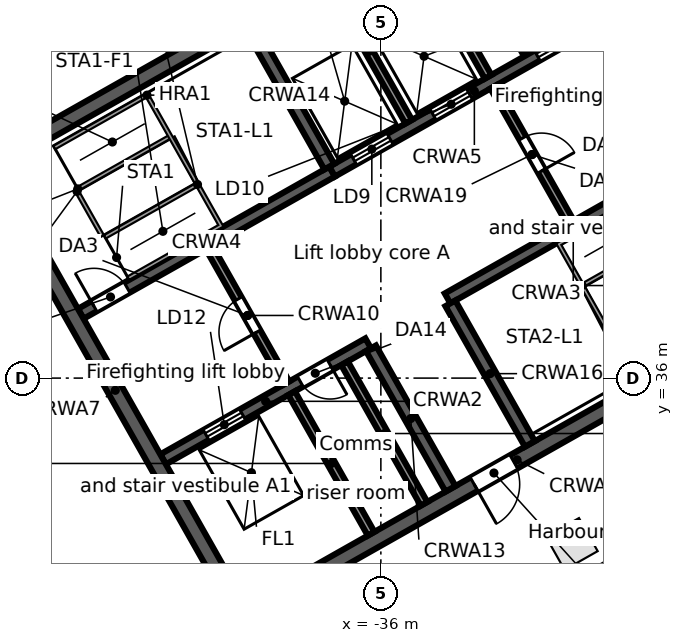
"""IFC4 building model, lengths in metres.
Left out: names, types, materials, properties, quantities, classifications, styles, units other than length and angle.
Written with IfcOpenShell. Run it as: python <this file> out.ifc"""

import sys

from ifc_helpers import new_model, si_unit, direction, frame, frame_2d, origin, origin_2d, place, context, subcontext, project, spatial, rectangle, extrude, element, fill, save


model = new_model("IFC4")
c1 = context("Model", 3, precision=1e-05, world=origin(), true_north=direction((0.0, 1.0)))
c2 = subcontext(c1, "Body", "Model", "MODEL_VIEW")
j1 = project(units=[si_unit("LENGTHUNIT", "METRE"), si_unit("PLANEANGLEUNIT", "RADIAN")], contexts=[c1])
p1 = place(None, origin())
s1 = spatial("IfcSite", under=j1, at=p1, CompositionType="ELEMENT")
p2 = place(p1, origin())
s2 = spatial("IfcBuilding", under=s1, at=p2, CompositionType="ELEMENT")
p3 = place(p2, frame((0.0, 0.0, 331.7)))
s3 = spatial("IfcBuildingStorey", under=s2, at=p3, CompositionType="ELEMENT", Elevation=331.7)
p4 = place(p3, frame((-30.976, 31.635, 0.0), z_axis=(0.0, 0.0, 1.0), x_axis=(0.87035569594, 0.492423560103, 0.0)))
e1 = element("IfcColumn", 1, at=p4, inside=s3, PredefinedType="COLUMN", context=c2, shape_type="SweptSolid", body=[
    extrude(rectangle(XDim=1.0, YDim=1.0, at=origin_2d()), origin(), (0.0, 0.0, 1.0), 3.8),
])
p5 = place(p3, frame((-44.115, 26.507, 0.0), z_axis=(0.0, 0.0, 1.0), x_axis=(-0.857166583633, 0.515039268311, 0.0)))
e2 = element("IfcWall", 2, at=p5, inside=s3, PredefinedType="STANDARD", context=c2, shape_type="SweptSolid", body=[
    extrude(rectangle(XDim=17.106, YDim=0.25, at=frame_2d((8.553, 0.0))), origin(), (0.0, 0.0, 1.0), 3.52),
])
p6 = place(p5, frame((14.417, 0.0, 0.8)))
e3 = element("IfcOpeningElement", 3, at=p6, cuts=e2, PredefinedType="OPENING", context=c2, shape_type="SweptSolid", body=[
    extrude(rectangle(XDim=2.4, YDim=2.2, at=frame_2d((1.2, 1.1))), frame((0.0, 0.135, 0.0), z_axis=(0.0, -1.0, 0.0), x_axis=(1.0, 0.0, 0.0)), (0.0, 0.0, 1.0), 0.27),
])
p7 = place(p5, frame((11.584, 0.0, 0.8)))
e4 = element("IfcOpeningElement", 4, at=p7, cuts=e2, PredefinedType="OPENING", context=c2, shape_type="SweptSolid", body=[
    extrude(rectangle(XDim=2.4, YDim=2.2, at=frame_2d((1.2, 1.1))), frame((0.0, 0.135, 0.0), z_axis=(0.0, -1.0, 0.0), x_axis=(1.0, 0.0, 0.0)), (0.0, 0.0, 1.0), 0.27),
])
p8 = place(p5, frame((8.75, 0.0, 0.8)))
e5 = element("IfcOpeningElement", 5, at=p8, cuts=e2, PredefinedType="OPENING", context=c2, shape_type="SweptSolid", body=[
    extrude(rectangle(XDim=2.4, YDim=2.2, at=frame_2d((1.2, 1.1))), frame((0.0, 0.135, 0.0), z_axis=(0.0, -1.0, 0.0), x_axis=(1.0, 0.0, 0.0)), (0.0, 0.0, 1.0), 0.27),
])
p9 = place(p5, frame((5.917, 0.0, 0.8)))
e6 = element("IfcOpeningElement", 6, at=p9, cuts=e2, PredefinedType="OPENING", context=c2, shape_type="SweptSolid", body=[
    extrude(rectangle(XDim=2.4, YDim=2.2, at=frame_2d((1.2, 1.1))), frame((0.0, 0.135, 0.0), z_axis=(0.0, -1.0, 0.0), x_axis=(1.0, 0.0, 0.0)), (0.0, 0.0, 1.0), 0.27),
])
p10 = place(p5, frame((3.084, 0.0, 0.8)))
e7 = element("IfcOpeningElement", 7, at=p10, cuts=e2, PredefinedType="OPENING", context=c2, shape_type="SweptSolid", body=[
    extrude(rectangle(XDim=2.4, YDim=2.2, at=frame_2d((1.2, 1.1))), frame((0.0, 0.135, 0.0), z_axis=(0.0, -1.0, 0.0), x_axis=(1.0, 0.0, 0.0)), (0.0, 0.0, 1.0), 0.27),
])
p11 = place(p5, frame((0.25, 0.0, 0.8)))
e8 = element("IfcOpeningElement", 8, at=p11, cuts=e2, PredefinedType="OPENING", context=c2, shape_type="SweptSolid", body=[
    extrude(rectangle(XDim=2.4, YDim=2.2, at=frame_2d((1.2, 1.1))), frame((0.0, 0.135, 0.0), z_axis=(0.0, -1.0, 0.0), x_axis=(1.0, 0.0, 0.0)), (0.0, 0.0, 1.0), 0.27),
])
p12 = place(p3, frame((-3.017, 46.293, 0.0), z_axis=(0.0, 0.0, 1.0), x_axis=(-0.870355474887, -0.492423950812, 0.0)))
e9 = element("IfcWall", 9, at=p12, inside=s3, PredefinedType="STANDARD", context=c2, shape_type="SweptSolid", body=[
    extrude(rectangle(XDim=40.34, YDim=0.25, at=frame_2d((20.17, 0.0))), origin(), (0.0, 0.0, 1.0), 3.52),
])
p13 = place(p12, frame((37.428, 0.0, 0.8)))
e10 = element("IfcOpeningElement", 10, at=p13, cuts=e9, PredefinedType="OPENING", context=c2, shape_type="SweptSolid", body=[
    extrude(rectangle(XDim=2.4, YDim=2.2, at=frame_2d((1.2, 1.1))), frame((0.0, 0.135, 0.0), z_axis=(0.0, -1.0, 0.0), x_axis=(1.0, 0.0, 0.0)), (0.0, 0.0, 1.0), 0.27),
])
p14 = place(p12, frame((34.372, 0.0, 0.0)))
e11 = element("IfcOpeningElement", 11, at=p14, cuts=e9, PredefinedType="OPENING", context=c2, shape_type="SweptSolid", body=[
    extrude(rectangle(XDim=1.8, YDim=2.4, at=frame_2d((0.9, 1.2))), frame((0.0, 0.135, 0.0), z_axis=(0.0, -1.0, 0.0), x_axis=(1.0, 0.0, 0.0)), (0.0, 0.0, 1.0), 0.27),
])
p15 = place(p12, frame((30.716, 0.0, 0.8)))
e12 = element("IfcOpeningElement", 12, at=p15, cuts=e9, PredefinedType="OPENING", context=c2, shape_type="SweptSolid", body=[
    extrude(rectangle(XDim=2.4, YDim=2.2, at=frame_2d((1.2, 1.1))), frame((0.0, 0.135, 0.0), z_axis=(0.0, -1.0, 0.0), x_axis=(1.0, 0.0, 0.0)), (0.0, 0.0, 1.0), 0.27),
])
p16 = place(p12, frame((27.36, 0.0, 0.8)))
e13 = element("IfcOpeningElement", 13, at=p16, cuts=e9, PredefinedType="OPENING", context=c2, shape_type="SweptSolid", body=[
    extrude(rectangle(XDim=2.4, YDim=2.2, at=frame_2d((1.2, 1.1))), frame((0.0, 0.135, 0.0), z_axis=(0.0, -1.0, 0.0), x_axis=(1.0, 0.0, 0.0)), (0.0, 0.0, 1.0), 0.27),
])
p17 = place(p12, frame((24.304, 0.0, 0.0)))
e14 = element("IfcOpeningElement", 14, at=p17, cuts=e9, PredefinedType="OPENING", context=c2, shape_type="SweptSolid", body=[
    extrude(rectangle(XDim=1.8, YDim=2.4, at=frame_2d((0.9, 1.2))), frame((0.0, 0.135, 0.0), z_axis=(0.0, -1.0, 0.0), x_axis=(1.0, 0.0, 0.0)), (0.0, 0.0, 1.0), 0.27),
])
p18 = place(p12, frame((20.648, 0.0, 0.8)))
e15 = element("IfcOpeningElement", 15, at=p18, cuts=e9, PredefinedType="OPENING", context=c2, shape_type="SweptSolid", body=[
    extrude(rectangle(XDim=2.4, YDim=2.2, at=frame_2d((1.2, 1.1))), frame((0.0, 0.135, 0.0), z_axis=(0.0, -1.0, 0.0), x_axis=(1.0, 0.0, 0.0)), (0.0, 0.0, 1.0), 0.27),
])
p19 = place(p12, frame((17.292, 0.0, 0.8)))
e16 = element("IfcOpeningElement", 16, at=p19, cuts=e9, PredefinedType="OPENING", context=c2, shape_type="SweptSolid", body=[
    extrude(rectangle(XDim=2.4, YDim=2.2, at=frame_2d((1.2, 1.1))), frame((0.0, 0.135, 0.0), z_axis=(0.0, -1.0, 0.0), x_axis=(1.0, 0.0, 0.0)), (0.0, 0.0, 1.0), 0.27),
])
p20 = place(p12, frame((14.236, 0.0, 0.0)))
e17 = element("IfcOpeningElement", 17, at=p20, cuts=e9, PredefinedType="OPENING", context=c2, shape_type="SweptSolid", body=[
    extrude(rectangle(XDim=1.8, YDim=2.4, at=frame_2d((0.9, 1.2))), frame((0.0, 0.135, 0.0), z_axis=(0.0, -1.0, 0.0), x_axis=(1.0, 0.0, 0.0)), (0.0, 0.0, 1.0), 0.27),
])
p21 = place(p12, frame((10.58, 0.0, 0.8)))
e18 = element("IfcOpeningElement", 18, at=p21, cuts=e9, PredefinedType="OPENING", context=c2, shape_type="SweptSolid", body=[
    extrude(rectangle(XDim=2.4, YDim=2.2, at=frame_2d((1.2, 1.1))), frame((0.0, 0.135, 0.0), z_axis=(0.0, -1.0, 0.0), x_axis=(1.0, 0.0, 0.0)), (0.0, 0.0, 1.0), 0.27),
])
p22 = place(p12, frame((7.224, 0.0, 0.8)))
e19 = element("IfcOpeningElement", 19, at=p22, cuts=e9, PredefinedType="OPENING", context=c2, shape_type="SweptSolid", body=[
    extrude(rectangle(XDim=2.4, YDim=2.2, at=frame_2d((1.2, 1.1))), frame((0.0, 0.135, 0.0), z_axis=(0.0, -1.0, 0.0), x_axis=(1.0, 0.0, 0.0)), (0.0, 0.0, 1.0), 0.27),
])
p23 = place(p12, frame((4.168, 0.0, 0.0)))
e20 = element("IfcOpeningElement", 20, at=p23, cuts=e9, PredefinedType="OPENING", context=c2, shape_type="SweptSolid", body=[
    extrude(rectangle(XDim=1.8, YDim=2.4, at=frame_2d((0.9, 1.2))), frame((0.0, 0.135, 0.0), z_axis=(0.0, -1.0, 0.0), x_axis=(1.0, 0.0, 0.0)), (0.0, 0.0, 1.0), 0.27),
])
p24 = place(p12, frame((0.512, 0.0, 0.8)))
e21 = element("IfcOpeningElement", 21, at=p24, cuts=e9, PredefinedType="OPENING", context=c2, shape_type="SweptSolid", body=[
    extrude(rectangle(XDim=2.4, YDim=2.2, at=frame_2d((1.2, 1.1))), frame((0.0, 0.135, 0.0), z_axis=(0.0, -1.0, 0.0), x_axis=(1.0, 0.0, 0.0)), (0.0, 0.0, 1.0), 0.27),
])
p25 = place(p3, frame((-39.813, 29.662, 0.0), z_axis=(0.0, 0.0, 1.0), x_axis=(0.870350116061, 0.492433422375, 0.0)))
e22 = element("IfcWall", 22, at=p25, inside=s3, PredefinedType="SOLIDWALL", context=c2, shape_type="SweptSolid", body=[
    extrude(rectangle(XDim=17.0, YDim=0.4, at=frame_2d((8.5, 0.0))), origin(), (0.0, 0.0, 1.0), 3.52),
])
p26 = place(p25, frame((7.2, 0.0, 0.0)))
e23 = element("IfcOpeningElement", 23, at=p26, cuts=e22, PredefinedType="OPENING", context=c2, shape_type="SweptSolid", body=[
    extrude(rectangle(XDim=1.2, YDim=2.1, at=frame_2d((0.6, 1.05))), frame((0.0, 0.21, 0.0), z_axis=(0.0, -1.0, 0.0), x_axis=(1.0, 0.0, 0.0)), (0.0, 0.0, 1.0), 0.42),
])
p27 = place(p3, frame((-41.73, 33.863, 0.0), z_axis=(0.0, 0.0, 1.0), x_axis=(0.870350800578, 0.492432212525, 0.0)))
e24 = element("IfcWall", 24, at=p27, inside=s3, PredefinedType="SOLIDWALL", context=c2, shape_type="SweptSolid", body=[
    extrude(rectangle(XDim=6.2, YDim=0.3, at=frame_2d((3.1, 0.0))), origin(), (0.0, 0.0, 1.0), 3.52),
])
p28 = place(p27, frame((1.3, 0.0, 0.0)))
e25 = element("IfcOpeningElement", 25, at=p28, cuts=e24, PredefinedType="OPENING", context=c2, shape_type="SweptSolid", body=[
    extrude(rectangle(XDim=1.1, YDim=2.1, at=frame_2d((0.55, 1.05))), frame((0.0, 0.16, 0.0), z_axis=(0.0, -1.0, 0.0), x_axis=(1.0, 0.0, 0.0)), (0.0, 0.0, 1.0), 0.32),
])
p29 = place(p27, frame((4.15, 0.0, 0.0)))
e26 = element("IfcOpeningElement", 26, at=p29, cuts=e24, PredefinedType="OPENING", context=c2, shape_type="SweptSolid", body=[
    extrude(rectangle(XDim=0.9, YDim=2.1, at=frame_2d((0.45, 1.05))), frame((0.0, 0.16, 0.0), z_axis=(0.0, -1.0, 0.0), x_axis=(1.0, 0.0, 0.0)), (0.0, 0.0, 1.0), 0.32),
])
p30 = place(p3, frame((-34.245, 38.097, 0.0), z_axis=(0.0, 0.0, 1.0), x_axis=(0.870356351998, 0.492422400523, 0.0)))
e27 = element("IfcWall", 27, at=p30, inside=s3, PredefinedType="SOLIDWALL", context=c2, shape_type="SweptSolid", body=[
    extrude(rectangle(XDim=7.6, YDim=0.3, at=frame_2d((3.8, 0.0))), origin(), (0.0, 0.0, 1.0), 3.52),
])
p31 = place(p30, frame((6.2, 0.0, 0.0)))
e28 = element("IfcOpeningElement", 28, at=p31, cuts=e27, PredefinedType="OPENING", context=c2, shape_type="SweptSolid", body=[
    extrude(rectangle(XDim=1.0, YDim=2.1, at=frame_2d((0.5, 1.05))), frame((0.0, 0.16, 0.0), z_axis=(0.0, -1.0, 0.0), x_axis=(1.0, 0.0, 0.0)), (0.0, 0.0, 1.0), 0.32),
])
p32 = place(p3, frame((-43.897, 37.692, 0.0), z_axis=(0.0, 0.0, 1.0), x_axis=(0.870356351998, 0.492422400523, 0.0)))
e29 = element("IfcWall", 29, at=p32, inside=s3, PredefinedType="SOLIDWALL", context=c2, shape_type="SweptSolid", body=[
    extrude(rectangle(XDim=7.6, YDim=0.3, at=frame_2d((3.8, 0.0))), origin(), (0.0, 0.0, 1.0), 3.52),
])
p33 = place(p32, frame((0.4, 0.0, 0.0)))
e30 = element("IfcOpeningElement", 30, at=p33, cuts=e29, PredefinedType="OPENING", context=c2, shape_type="SweptSolid", body=[
    extrude(rectangle(XDim=1.0, YDim=2.1, at=frame_2d((0.5, 1.05))), frame((0.0, 0.16, 0.0), z_axis=(0.0, -1.0, 0.0), x_axis=(1.0, 0.0, 0.0)), (0.0, 0.0, 1.0), 0.32),
])
p34 = place(p3, frame((-37.282, 41.435, 0.0), z_axis=(0.0, 0.0, 1.0), x_axis=(0.870361315115, 0.492413628113, 0.0)))
e31 = element("IfcWall", 31, at=p34, inside=s3, PredefinedType="SOLIDWALL", context=c2, shape_type="SweptSolid", body=[
    extrude(rectangle(XDim=8.6, YDim=0.3, at=frame_2d((4.3, 0.0))), origin(), (0.0, 0.0, 1.0), 3.52),
])
p35 = place(p34, frame((0.65, 0.0, 0.0)))
e32 = element("IfcOpeningElement", 32, at=p35, cuts=e31, PredefinedType="OPENING", context=c2, shape_type="SweptSolid", body=[
    extrude(rectangle(XDim=1.1, YDim=2.1, at=frame_2d((0.55, 1.05))), frame((0.0, 0.16, 0.0), z_axis=(0.0, -1.0, 0.0), x_axis=(1.0, 0.0, 0.0)), (0.0, 0.0, 1.0), 0.32),
])
p36 = place(p34, frame((3.05, 0.0, 0.0)))
e33 = element("IfcOpeningElement", 33, at=p36, cuts=e31, PredefinedType="OPENING", context=c2, shape_type="SweptSolid", body=[
    extrude(rectangle(XDim=1.1, YDim=2.1, at=frame_2d((0.55, 1.05))), frame((0.0, 0.16, 0.0), z_axis=(0.0, -1.0, 0.0), x_axis=(1.0, 0.0, 0.0)), (0.0, 0.0, 1.0), 0.32),
])
p37 = place(p34, frame((6.2, 0.0, 0.0)))
e34 = element("IfcOpeningElement", 34, at=p37, cuts=e31, PredefinedType="OPENING", context=c2, shape_type="SweptSolid", body=[
    extrude(rectangle(XDim=1.1, YDim=2.1, at=frame_2d((0.55, 1.05))), frame((0.0, 0.16, 0.0), z_axis=(0.0, -1.0, 0.0), x_axis=(1.0, 0.0, 0.0)), (0.0, 0.0, 1.0), 0.32),
])
p38 = place(p3, frame((-46.51, 41.499, 0.0), z_axis=(0.0, 0.0, 1.0), x_axis=(0.870356271124, 0.492422543467, 0.0)))
e35 = element("IfcWall", 35, at=p38, inside=s3, PredefinedType="SOLIDWALL", context=c2, shape_type="SweptSolid", body=[
    extrude(rectangle(XDim=17.0, YDim=0.4, at=frame_2d((8.5, 0.0))), origin(), (0.0, 0.0, 1.0), 3.52),
])
p39 = place(p3, frame((-46.238, 41.423, 0.0), z_axis=(0.0, 0.0, 1.0), x_axis=(0.492421663121, -0.870356769198, 0.0)))
e36 = element("IfcWall", 36, at=p39, inside=s3, PredefinedType="SOLIDWALL", context=c2, shape_type="SweptSolid", body=[
    extrude(rectangle(XDim=13.2, YDim=0.4, at=frame_2d((6.6, 0.0))), origin(), (0.0, 0.0, 1.0), 3.52),
])
p40 = place(p3, frame((-38.349, 35.603, 0.0), z_axis=(0.0, 0.0, 1.0), x_axis=(0.492397924348, -0.870370199454, 0.0)))
e37 = element("IfcWall", 37, at=p40, inside=s3, PredefinedType="SOLIDWALL", context=c2, shape_type="SweptSolid", body=[
    extrude(rectangle(XDim=4.25, YDim=0.2, at=frame_2d((2.125, 0.0))), origin(), (0.0, 0.0, 1.0), 3.52),
])
p41 = place(p3, frame((-40.516, 39.433, 0.0), z_axis=(0.0, 0.0, 1.0), x_axis=(0.492453559952, -0.87033872216, 0.0)))
e38 = element("IfcWall", 38, at=p41, inside=s3, PredefinedType="PARTITIONING", context=c2, shape_type="SweptSolid", body=[
    extrude(rectangle(XDim=4.1, YDim=0.2, at=frame_2d((2.05, 0.0))), origin(), (0.0, 0.0, 1.0), 3.52),
])
p42 = place(p41, frame((1.55, 0.0, 0.0)))
e39 = element("IfcOpeningElement", 39, at=p42, cuts=e38, PredefinedType="OPENING", context=c2, shape_type="SweptSolid", body=[
    extrude(rectangle(XDim=1.0, YDim=2.1, at=frame_2d((0.5, 1.05))), frame((0.0, 0.11, 0.0), z_axis=(0.0, -1.0, 0.0), x_axis=(1.0, 0.0, 0.0)), (0.0, 0.0, 1.0), 0.22),
])
p43 = place(p3, frame((-36.956, 36.391, 0.0), z_axis=(0.0, 0.0, 1.0), x_axis=(0.492397924348, -0.870370199454, 0.0)))
e40 = element("IfcWall", 40, at=p43, inside=s3, PredefinedType="SOLIDWALL", context=c2, shape_type="SweptSolid", body=[
    extrude(rectangle(XDim=4.25, YDim=0.2, at=frame_2d((2.125, 0.0))), origin(), (0.0, 0.0, 1.0), 3.52),
])
for number, where, z_axis, x_axis in (
    (41, (-36.26, 36.785, 0.0), (0.0, 0.0, 1.0), (0.492, -0.87, 0.0)),
    (42, (-39.449, 45.264, 0.0), (0.0, 0.0, 1.0), (0.492, -0.87, 0.0)),
    (43, (-34.171, 37.967, 0.0), (0.0, 0.0, 1.0), (0.492, -0.87, 0.0)),
):
    element("IfcWall", number, at=place(p3, frame(where, z_axis=z_axis, x_axis=x_axis)), inside=s3, PredefinedType="SOLIDWALL", context=c2, shape_type="SweptSolid", body=[
        extrude(rectangle(XDim=4.25, YDim=0.3, at=frame_2d((2.125, 0.0))), origin(), (0.0, 0.0, 1.0), 3.52),
    ])
p44 = place(p3, frame((-37.36, 46.446, 0.0), z_axis=(0.0, 0.0, 1.0), x_axis=(0.492422543467, -0.870356271124, 0.0)))
e44 = element("IfcWall", 44, at=p44, inside=s3, PredefinedType="SOLIDWALL", context=c2, shape_type="SweptSolid", body=[
    extrude(rectangle(XDim=4.25, YDim=0.2, at=frame_2d((2.125, 0.0))), origin(), (0.0, 0.0, 1.0), 3.52),
])
p45 = place(p3, frame((-33.031, 43.667, 0.0), z_axis=(0.0, 0.0, 1.0), x_axis=(0.492408451753, -0.87036424366, 0.0)))
e45 = element("IfcWall", 45, at=p45, inside=s3, PredefinedType="PARTITIONING", context=c2, shape_type="SweptSolid", body=[
    extrude(rectangle(XDim=4.1, YDim=0.2, at=frame_2d((2.05, 0.0))), origin(), (0.0, 0.0, 1.0), 3.52),
])
p46 = place(p45, frame((1.55, 0.0, 0.0)))
e46 = element("IfcOpeningElement", 46, at=p46, cuts=e45, PredefinedType="OPENING", context=c2, shape_type="SweptSolid", body=[
    extrude(rectangle(XDim=1.0, YDim=2.1, at=frame_2d((0.5, 1.05))), frame((0.0, 0.11, 0.0), z_axis=(0.0, -1.0, 0.0), x_axis=(1.0, 0.0, 0.0)), (0.0, 0.0, 1.0), 0.22),
])
p47 = place(p3, frame((-35.271, 47.628, 0.0), z_axis=(0.0, 0.0, 1.0), x_axis=(0.492422543467, -0.870356271124, 0.0)))
e47 = element("IfcWall", 47, at=p47, inside=s3, PredefinedType="SOLIDWALL", context=c2, shape_type="SweptSolid", body=[
    extrude(rectangle(XDim=4.25, YDim=0.2, at=frame_2d((2.125, 0.0))), origin(), (0.0, 0.0, 1.0), 3.52),
])
p48 = place(p3, frame((-31.79, 49.597, 0.0), z_axis=(0.0, 0.0, 1.0), x_axis=(0.492421663121, -0.870356769198, 0.0)))
e48 = element("IfcWall", 48, at=p48, inside=s3, PredefinedType="SOLIDWALL", context=c2, shape_type="SweptSolid", body=[
    extrude(rectangle(XDim=13.2, YDim=0.4, at=frame_2d((6.6, 0.0))), origin(), (0.0, 0.0, 1.0), 3.52),
])
p49 = place(p15, origin())
e49 = element("IfcWindow", 49, at=p49, inside=s3, PartitioningType="SINGLE_PANEL", PredefinedType="WINDOW", context=c2, shape_type="SweptSolid", body=[
    extrude(rectangle(XDim=2.4, YDim=2.2, at=frame_2d((1.2, 1.1))), frame((0.0, 0.03, 0.0), z_axis=(0.0, -1.0, 0.0), x_axis=(1.0, 0.0, 0.0)), (0.0, 0.0, 1.0), 0.06),
])
fill(e12, e49)
p50 = place(p35, origin())
e50 = element("IfcDoor", 50, at=p50, inside=s3, OperationType="DOUBLE_DOOR_SLIDING", PredefinedType="DOOR", context=c2, shape_type="SweptSolid", body=[
    extrude(rectangle(XDim=1.1, YDim=2.1, at=frame_2d((0.55, 1.05))), frame((0.0, 0.025, 0.0), z_axis=(0.0, -1.0, 0.0), x_axis=(1.0, 0.0, 0.0)), (0.0, 0.0, 1.0), 0.05),
])
fill(e32, e50)
p51 = place(p36, origin())
e51 = element("IfcDoor", 51, at=p51, inside=s3, OperationType="DOUBLE_DOOR_SLIDING", PredefinedType="DOOR", context=c2, shape_type="SweptSolid", body=[
    extrude(rectangle(XDim=1.1, YDim=2.1, at=frame_2d((0.55, 1.05))), frame((0.0, 0.025, 0.0), z_axis=(0.0, -1.0, 0.0), x_axis=(1.0, 0.0, 0.0)), (0.0, 0.0, 1.0), 0.05),
])
fill(e33, e51)
p52 = place(p37, origin())
e52 = element("IfcDoor", 52, at=p52, inside=s3, OperationType="DOUBLE_DOOR_SLIDING", PredefinedType="DOOR", context=c2, shape_type="SweptSolid", body=[
    extrude(rectangle(XDim=1.1, YDim=2.1, at=frame_2d((0.55, 1.05))), frame((0.0, 0.025, 0.0), z_axis=(0.0, -1.0, 0.0), x_axis=(1.0, 0.0, 0.0)), (0.0, 0.0, 1.0), 0.05),
])
fill(e34, e52)
p53 = place(p28, origin())
e53 = element("IfcDoor", 53, at=p53, inside=s3, OperationType="DOUBLE_DOOR_SLIDING", PredefinedType="DOOR", context=c2, shape_type="SweptSolid", body=[
    extrude(rectangle(XDim=1.1, YDim=2.1, at=frame_2d((0.55, 1.05))), frame((0.0, 0.025, 0.0), z_axis=(0.0, -1.0, 0.0), x_axis=(1.0, 0.0, 0.0)), (0.0, 0.0, 1.0), 0.05),
])
fill(e25, e53)
p54 = place(p33, origin())
e54 = element("IfcDoor", 54, at=p54, inside=s3, OperationType="SINGLE_SWING_LEFT", PredefinedType="DOOR", context=c2, shape_type="SweptSolid", body=[
    extrude(rectangle(XDim=1.0, YDim=2.1, at=frame_2d((0.5, 1.05))), frame((0.0, 0.025, 0.0), z_axis=(0.0, -1.0, 0.0), x_axis=(1.0, 0.0, 0.0)), (0.0, 0.0, 1.0), 0.05),
])
fill(e30, e54)
p55 = place(p42, frame((1.0, 0.0, 0.0), z_axis=(0.0, 0.0, 1.0), x_axis=(-1.0, 0.0, 0.0)))
e55 = element("IfcDoor", 55, at=p55, inside=s3, OperationType="SINGLE_SWING_LEFT", PredefinedType="DOOR", context=c2, shape_type="SweptSolid", body=[
    extrude(rectangle(XDim=1.0, YDim=2.1, at=frame_2d((0.5, 1.05))), frame((0.0, 0.025, 0.0), z_axis=(0.0, -1.0, 0.0), x_axis=(1.0, 0.0, 0.0)), (0.0, 0.0, 1.0), 0.05),
])
fill(e39, e55)
p56 = place(p46, origin())
e56 = element("IfcDoor", 56, at=p56, inside=s3, OperationType="SINGLE_SWING_RIGHT", PredefinedType="DOOR", context=c2, shape_type="SweptSolid", body=[
    extrude(rectangle(XDim=1.0, YDim=2.1, at=frame_2d((0.5, 1.05))), frame((0.0, 0.025, 0.0), z_axis=(0.0, -1.0, 0.0), x_axis=(1.0, 0.0, 0.0)), (0.0, 0.0, 1.0), 0.05),
])
fill(e46, e56)
p57 = place(p26, frame((1.2, 0.0, 0.0), z_axis=(0.0, 0.0, 1.0), x_axis=(-1.0, 0.0, 0.0)))
e57 = element("IfcDoor", 57, at=p57, inside=s3, OperationType="SINGLE_SWING_RIGHT", PredefinedType="DOOR", context=c2, shape_type="SweptSolid", body=[
    extrude(rectangle(XDim=1.2, YDim=2.1, at=frame_2d((0.6, 1.05))), frame((0.0, 0.025, 0.0), z_axis=(0.0, -1.0, 0.0), x_axis=(1.0, 0.0, 0.0)), (0.0, 0.0, 1.0), 0.05),
])
fill(e23, e57)
p58 = place(p29, frame((0.9, 0.0, 0.0), z_axis=(0.0, 0.0, 1.0), x_axis=(-1.0, 0.0, 0.0)))
e58 = element("IfcDoor", 58, at=p58, inside=s3, OperationType="SINGLE_SWING_LEFT", PredefinedType="DOOR", context=c2, shape_type="SweptSolid", body=[
    extrude(rectangle(XDim=0.9, YDim=2.1, at=frame_2d((0.45, 1.05))), frame((0.0, 0.025, 0.0), z_axis=(0.0, -1.0, 0.0), x_axis=(1.0, 0.0, 0.0)), (0.0, 0.0, 1.0), 0.05),
])
fill(e26, e58)
save(model, sys.argv[1])
